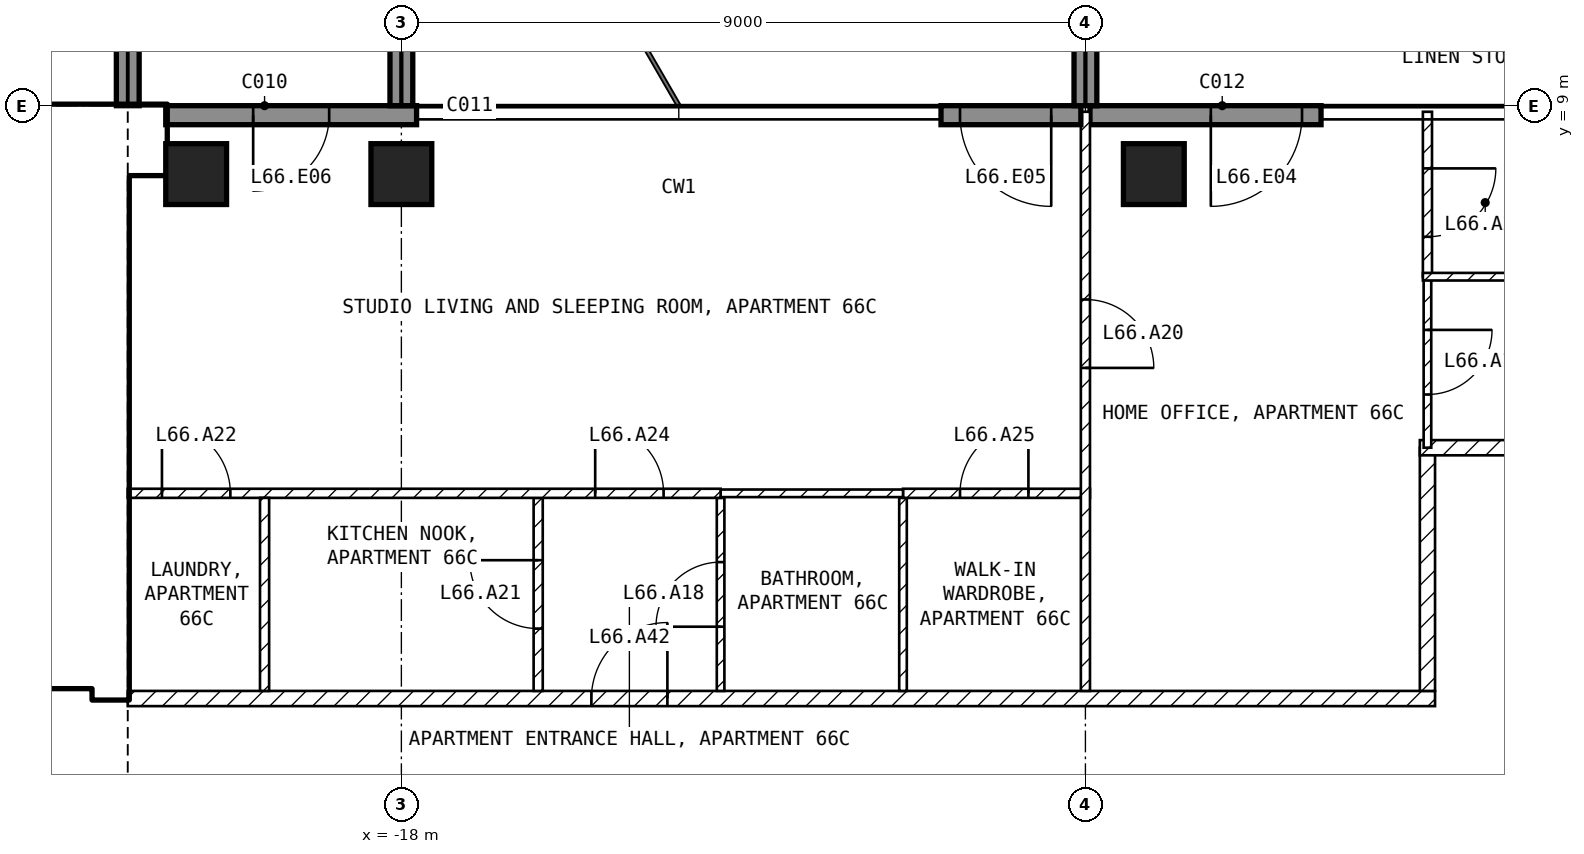
"""IFC4 building model, lengths in metres.
Left out: names, types, materials, properties, quantities, classifications, styles, units other than length and angle.
Written with IfcOpenShell. Run it as: python <this file> out.ifc"""

import sys

from ifc_helpers import new_model, si_unit, direction, frame, frame_2d, origin, origin_2d, place, context, subcontext, project, spatial, rectangle, extrude, element, fill, save


model = new_model("IFC4")
c1 = context("Model", 3, precision=1e-05, world=origin(), true_north=direction((0.0, 1.0)))
c2 = subcontext(c1, "Body", "Model", "MODEL_VIEW")
j1 = project(units=[si_unit("LENGTHUNIT", "METRE"), si_unit("PLANEANGLEUNIT", "RADIAN")], contexts=[c1])
p1 = place(None, origin())
s1 = spatial("IfcSite", under=j1, at=p1, CompositionType="ELEMENT")
p2 = place(p1, origin())
s2 = spatial("IfcBuilding", under=s1, at=p2, CompositionType="ELEMENT")
p3 = place(p2, frame((0.0, 0.0, 260.5)))
s3 = spatial("IfcBuildingStorey", under=s2, at=p3, CompositionType="ELEMENT", Elevation=260.5)
for number, where, z_axis, x_axis in (
    (1, (-20.7, 8.1, -0.25), (0.0, 0.0, 1.0), (1.0, 0.0, 0.0)),
    (2, (-18.0, 8.1, -0.25), (0.0, 0.0, 1.0), (1.0, 0.0, 0.0)),
    (3, (-8.1, 8.1, -0.25), (0.0, 0.0, 1.0), (1.0, 0.0, 0.0)),
):
    element("IfcColumn", number, at=place(p3, frame(where, z_axis=z_axis, x_axis=x_axis)), inside=s3, PredefinedType="COLUMN", context=c2, shape_type="SweptSolid", body=[
        extrude(rectangle(XDim=0.8, YDim=0.8, at=origin_2d()), origin(), (0.0, 0.0, 1.0), 3.5),
    ])
p4 = place(p3, frame((-5.9, 8.875, 0.0), z_axis=(0.0, 0.0, 1.0), x_axis=(-1.0, 0.0, 0.0)))
e4 = element("IfcWall", 4, at=p4, inside=s3, PredefinedType="SOLIDWALL", context=c2, shape_type="SweptSolid", body=[
    extrude(rectangle(XDim=3.04, YDim=0.25, at=frame_2d((1.52, 0.0))), origin(), (0.0, 0.0, 1.0), 3.25),
])
p5 = place(p4, frame((0.25, 0.0, 0.0)))
e5 = element("IfcOpeningElement", 5, at=p5, cuts=e4, PredefinedType="OPENING", context=c2, shape_type="SweptSolid", body=[
    extrude(rectangle(XDim=1.2, YDim=2.4, at=frame_2d((0.6, 1.2))), frame((0.0, 0.135, 0.0), z_axis=(0.0, -1.0, 0.0), x_axis=(1.0, 0.0, 0.0)), (0.0, 0.0, 1.0), 0.27),
])
p6 = place(p3, frame((-9.06, 8.875, 0.0), z_axis=(0.0, 0.0, 1.0), x_axis=(-1.0, 0.0, 0.0)))
e6 = element("IfcWall", 6, at=p6, inside=s3, PredefinedType="SOLIDWALL", context=c2, shape_type="SweptSolid", body=[
    extrude(rectangle(XDim=1.84, YDim=0.25, at=frame_2d((0.92, 0.0))), origin(), (0.0, 0.0, 1.0), 3.25),
])
p7 = place(p6, frame((0.39, 0.0, 0.0)))
e7 = element("IfcOpeningElement", 7, at=p7, cuts=e6, PredefinedType="OPENING", context=c2, shape_type="SweptSolid", body=[
    extrude(rectangle(XDim=1.2, YDim=2.4, at=frame_2d((0.6, 1.2))), frame((0.0, 0.135, 0.0), z_axis=(0.0, -1.0, 0.0), x_axis=(1.0, 0.0, 0.0)), (0.0, 0.0, 1.0), 0.27),
])
p8 = place(p3, frame((-17.8, 8.875, 0.0), z_axis=(0.0, 0.0, 1.0), x_axis=(-1.0, 0.0, 0.0)))
e8 = element("IfcWall", 8, at=p8, inside=s3, PredefinedType="SOLIDWALL", context=c2, shape_type="SweptSolid", body=[
    extrude(rectangle(XDim=3.3, YDim=0.25, at=frame_2d((1.65, 0.0))), origin(), (0.0, 0.0, 1.0), 3.25),
])
p9 = place(p8, frame((1.15, 0.0, 0.0)))
e9 = element("IfcOpeningElement", 9, at=p9, cuts=e8, PredefinedType="OPENING", context=c2, shape_type="SweptSolid", body=[
    extrude(rectangle(XDim=1.0, YDim=2.4, at=frame_2d((0.5, 1.2))), frame((0.0, 0.135, 0.0), z_axis=(0.0, -1.0, 0.0), x_axis=(1.0, 0.0, 0.0)), (0.0, 0.0, 1.0), 0.27),
])
for number, where, z_axis, x_axis in (
    (10, (-21.6, 9.0, 0.0), (0.0, 0.0, 1.0), (0.0, 1.0, 0.0)),
    (11, (-18.0, 9.0, 0.0), (0.0, 0.0, 1.0), (0.0, 1.0, 0.0)),
    (12, (-9.0, 9.0, 0.0), (0.0, 0.0, 1.0), (0.0, 1.0, 0.0)),
):
    element("IfcWall", number, at=place(p3, frame(where, z_axis=z_axis, x_axis=x_axis)), inside=s3, PredefinedType="SOLIDWALL", context=c2, shape_type="SweptSolid", body=[
        extrude(rectangle(XDim=2.7, YDim=0.3, at=frame_2d((1.35, 0.0))), origin(), (0.0, 0.0, 1.0), 3.25),
    ])
p10 = place(p3, frame((-29.75, 8.55, 0.0), z_axis=(0.0, 0.0, 1.0), x_axis=(1.0, 0.0, 0.0)))
e13 = element("IfcWall", 13, at=p10, inside=s3, PredefinedType="SHEAR", context=c2, shape_type="SweptSolid", body=[
    extrude(rectangle(XDim=8.65, YDim=0.9, at=frame_2d((4.325, 0.0))), origin(), (0.0, 0.0, 1.0), 3.25),
])
p11 = place(p3, frame((-21.825, 1.2, 0.0), z_axis=(0.0, 0.0, 1.0), x_axis=(0.0, 1.0, 0.0)))
e14 = element("IfcWall", 14, at=p11, inside=s3, PredefinedType="SHEAR", context=c2, shape_type="SweptSolid", body=[
    extrude(rectangle(XDim=6.9, YDim=0.45, at=frame_2d((3.45, 0.0))), origin(), (0.0, 0.0, 1.0), 3.25),
])
p12 = place(p3, frame((-33.35, 1.45, 0.0), z_axis=(0.0, 0.0, 1.0), x_axis=(1.0, 0.0, 0.0)))
e15 = element("IfcWall", 15, at=p12, inside=s3, PredefinedType="SOLIDWALL", context=c2, shape_type="SweptSolid", body=[
    extrude(rectangle(XDim=11.3, YDim=0.2, at=frame_2d((5.65, 0.0))), origin(), (0.0, 0.0, 1.0), 3.25),
])
p13 = place(p12, frame((9.55, 0.0, 0.0)))
e16 = element("IfcOpeningElement", 16, at=p13, cuts=e15, PredefinedType="OPENING", context=c2, shape_type="SweptSolid", body=[
    extrude(rectangle(XDim=1.0, YDim=2.1, at=frame_2d((0.5, 1.05))), frame((0.0, 0.11, 0.0), z_axis=(0.0, -1.0, 0.0), x_axis=(1.0, 0.0, 0.0)), (0.0, 0.0, 1.0), 0.22),
])
p14 = place(p12, frame((7.05, 0.0, 0.0)))
e17 = element("IfcOpeningElement", 17, at=p14, cuts=e15, PredefinedType="OPENING", context=c2, shape_type="SweptSolid", body=[
    extrude(rectangle(XDim=1.0, YDim=2.1, at=frame_2d((0.5, 1.05))), frame((0.0, 0.11, 0.0), z_axis=(0.0, -1.0, 0.0), x_axis=(1.0, 0.0, 0.0)), (0.0, 0.0, 1.0), 0.22),
])
p15 = place(p12, frame((1.175, 0.0, 0.0)))
e18 = element("IfcOpeningElement", 18, at=p15, cuts=e15, PredefinedType="OPENING", context=c2, shape_type="SweptSolid", body=[
    extrude(rectangle(XDim=0.9, YDim=2.1, at=frame_2d((0.45, 1.05))), frame((0.0, 0.11, 0.0), z_axis=(0.0, -1.0, 0.0), x_axis=(1.0, 0.0, 0.0)), (0.0, 0.0, 1.0), 0.22),
])
p16 = place(p3, frame((-28.35, 5.15, 0.0), z_axis=(0.0, 0.0, 1.0), x_axis=(1.0, 0.0, 0.0)))
e19 = element("IfcWall", 19, at=p16, inside=s3, PredefinedType="SOLIDWALL", context=c2, shape_type="SweptSolid", body=[
    extrude(rectangle(XDim=6.3, YDim=0.2, at=frame_2d((3.15, 0.0))), origin(), (0.0, 0.0, 1.0), 3.25),
])
p17 = place(p16, frame((5.1, 0.0, 0.0)))
e20 = element("IfcOpeningElement", 20, at=p17, cuts=e19, PredefinedType="OPENING", context=c2, shape_type="SweptSolid", body=[
    extrude(rectangle(XDim=1.0, YDim=2.1, at=frame_2d((0.5, 1.05))), frame((0.0, 0.11, 0.0), z_axis=(0.0, -1.0, 0.0), x_axis=(1.0, 0.0, 0.0)), (0.0, 0.0, 1.0), 0.22),
])
p18 = place(p3, frame((-21.6, 1.2, 0.0), z_axis=(0.0, 0.0, 1.0), x_axis=(1.0, 0.0, 0.0)))
e21 = element("IfcWall", 21, at=p18, inside=s3, PredefinedType="PARTITIONING", context=c2, shape_type="SweptSolid", body=[
    extrude(rectangle(XDim=17.2, YDim=0.2, at=frame_2d((8.6, 0.0))), origin(), (0.0, 0.0, 1.0), 3.25),
])
p19 = place(p18, frame((6.1, 0.0, 0.0)))
e22 = element("IfcOpeningElement", 22, at=p19, cuts=e21, PredefinedType="OPENING", context=c2, shape_type="SweptSolid", body=[
    extrude(rectangle(XDim=1.0, YDim=2.1, at=frame_2d((0.5, 1.05))), frame((0.0, 0.11, 0.0), z_axis=(0.0, -1.0, 0.0), x_axis=(1.0, 0.0, 0.0)), (0.0, 0.0, 1.0), 0.22),
])
p20 = place(p3, frame((-4.5, 1.3, 0.0), z_axis=(0.0, 0.0, 1.0), x_axis=(0.0, 1.0, 0.0)))
e23 = element("IfcWall", 23, at=p20, inside=s3, PredefinedType="PARTITIONING", context=c2, shape_type="SweptSolid", body=[
    extrude(rectangle(XDim=3.2, YDim=0.2, at=frame_2d((1.6, 0.0))), origin(), (0.0, 0.0, 1.0), 3.25),
])
p21 = place(p3, frame((-4.6, 4.5, 0.0), z_axis=(0.0, 0.0, 1.0), x_axis=(1.0, 0.0, 0.0)))
e24 = element("IfcWall", 24, at=p21, inside=s3, PredefinedType="PARTITIONING", context=c2, shape_type="SweptSolid", body=[
    extrude(rectangle(XDim=3.5, YDim=0.2, at=frame_2d((1.75, 0.0))), origin(), (0.0, 0.0, 1.0), 3.25),
])
p22 = place(p3, frame((-11.4, 1.3, 0.0), z_axis=(0.0, 0.0, 1.0), x_axis=(0.0, 1.0, 0.0)))
e25 = element("IfcWall", 25, at=p22, inside=s3, PredefinedType="PARTITIONING", context=c2, shape_type="SweptSolid", body=[
    extrude(rectangle(XDim=2.54, YDim=0.1, at=frame_2d((1.27, 0.0))), origin(), (0.0, 0.0, 1.0), 3.25),
])
p23 = place(p3, frame((-11.4, 3.9, 0.0), z_axis=(0.0, 0.0, 1.0), x_axis=(1.0, 0.0, 0.0)))
e26 = element("IfcWall", 26, at=p23, inside=s3, PredefinedType="PARTITIONING", context=c2, shape_type="SweptSolid", body=[
    extrude(rectangle(XDim=2.46, YDim=0.12, at=frame_2d((1.23, 0.0))), origin(), (0.0, 0.0, 1.0), 3.25),
])
p24 = place(p23, frame((0.75, 0.0, 0.0)))
e27 = element("IfcOpeningElement", 27, at=p24, cuts=e26, PredefinedType="OPENING", context=c2, shape_type="SweptSolid", body=[
    extrude(rectangle(XDim=0.9, YDim=2.1, at=frame_2d((0.45, 1.05))), frame((0.0, 0.07, 0.0), z_axis=(0.0, -1.0, 0.0), x_axis=(1.0, 0.0, 0.0)), (0.0, 0.0, 1.0), 0.14),
])
p25 = place(p3, frame((-9.0, 8.92, 0.0), z_axis=(0.0, 0.0, 1.0), x_axis=(0.0, -1.0, 0.0)))
e28 = element("IfcWall", 28, at=p25, inside=s3, PredefinedType="PARTITIONING", context=c2, shape_type="SweptSolid", body=[
    extrude(rectangle(XDim=7.62, YDim=0.12, at=frame_2d((3.81, 0.0))), origin(), (0.0, 0.0, 1.0), 3.25),
])
p26 = place(p25, frame((2.47, 0.0, 0.0)))
e29 = element("IfcOpeningElement", 29, at=p26, cuts=e28, PredefinedType="OPENING", context=c2, shape_type="SweptSolid", body=[
    extrude(rectangle(XDim=0.9, YDim=2.1, at=frame_2d((0.45, 1.05))), frame((0.0, 0.07, 0.0), z_axis=(0.0, -1.0, 0.0), x_axis=(1.0, 0.0, 0.0)), (0.0, 0.0, 1.0), 0.14),
])
p27 = place(p3, frame((-13.8, 1.3, 0.0), z_axis=(0.0, 0.0, 1.0), x_axis=(0.0, 1.0, 0.0)))
e30 = element("IfcWall", 30, at=p27, inside=s3, PredefinedType="PARTITIONING", context=c2, shape_type="SweptSolid", body=[
    extrude(rectangle(XDim=2.54, YDim=0.1, at=frame_2d((1.27, 0.0))), origin(), (0.0, 0.0, 1.0), 3.25),
])
p28 = place(p27, frame((0.845, 0.0, 0.0)))
e31 = element("IfcOpeningElement", 31, at=p28, cuts=e30, PredefinedType="OPENING", context=c2, shape_type="SweptSolid", body=[
    extrude(rectangle(XDim=0.85, YDim=2.1, at=frame_2d((0.425, 1.05))), frame((0.0, 0.06, 0.0), z_axis=(0.0, -1.0, 0.0), x_axis=(1.0, 0.0, 0.0)), (0.0, 0.0, 1.0), 0.12),
])
p29 = place(p3, frame((-13.8, 3.9, 0.0), z_axis=(0.0, 0.0, 1.0), x_axis=(1.0, 0.0, 0.0)))
e32 = element("IfcWall", 32, at=p29, inside=s3, PredefinedType="PARTITIONING", context=c2, shape_type="SweptSolid", body=[
    extrude(rectangle(XDim=2.4, YDim=0.1, at=frame_2d((1.2, 0.0))), origin(), (0.0, 0.0, 1.0), 3.25),
])
p30 = place(p3, frame((-16.2, 1.3, 0.0), z_axis=(0.0, 0.0, 1.0), x_axis=(0.0, 1.0, 0.0)))
e33 = element("IfcWall", 33, at=p30, inside=s3, PredefinedType="PARTITIONING", context=c2, shape_type="SweptSolid", body=[
    extrude(rectangle(XDim=2.54, YDim=0.12, at=frame_2d((1.27, 0.0))), origin(), (0.0, 0.0, 1.0), 3.25),
])
p31 = place(p30, frame((0.82, 0.0, 0.0)))
e34 = element("IfcOpeningElement", 34, at=p31, cuts=e33, PredefinedType="OPENING", context=c2, shape_type="SweptSolid", body=[
    extrude(rectangle(XDim=0.9, YDim=2.1, at=frame_2d((0.45, 1.05))), frame((0.0, 0.07, 0.0), z_axis=(0.0, -1.0, 0.0), x_axis=(1.0, 0.0, 0.0)), (0.0, 0.0, 1.0), 0.14),
])
p32 = place(p3, frame((-21.6, 3.9, 0.0), z_axis=(0.0, 0.0, 1.0), x_axis=(1.0, 0.0, 0.0)))
e35 = element("IfcWall", 35, at=p32, inside=s3, PredefinedType="PARTITIONING", context=c2, shape_type="SweptSolid", body=[
    extrude(rectangle(XDim=7.8, YDim=0.12, at=frame_2d((3.9, 0.0))), origin(), (0.0, 0.0, 1.0), 3.25),
])
p33 = place(p32, frame((0.45, 0.0, 0.0)))
e36 = element("IfcOpeningElement", 36, at=p33, cuts=e35, PredefinedType="OPENING", context=c2, shape_type="SweptSolid", body=[
    extrude(rectangle(XDim=0.9, YDim=2.1, at=frame_2d((0.45, 1.05))), frame((0.0, 0.07, 0.0), z_axis=(0.0, -1.0, 0.0), x_axis=(1.0, 0.0, 0.0)), (0.0, 0.0, 1.0), 0.14),
])
p34 = place(p32, frame((6.15, 0.0, 0.0)))
e37 = element("IfcOpeningElement", 37, at=p34, cuts=e35, PredefinedType="OPENING", context=c2, shape_type="SweptSolid", body=[
    extrude(rectangle(XDim=0.9, YDim=2.1, at=frame_2d((0.45, 1.05))), frame((0.0, 0.07, 0.0), z_axis=(0.0, -1.0, 0.0), x_axis=(1.0, 0.0, 0.0)), (0.0, 0.0, 1.0), 0.14),
])
p35 = place(p3, frame((-19.8, 1.3, 0.0), z_axis=(0.0, 0.0, 1.0), x_axis=(0.0, 1.0, 0.0)))
e38 = element("IfcWall", 38, at=p35, inside=s3, PredefinedType="PARTITIONING", context=c2, shape_type="SweptSolid", body=[
    extrude(rectangle(XDim=2.54, YDim=0.12, at=frame_2d((1.27, 0.0))), origin(), (0.0, 0.0, 1.0), 3.25),
])
p36 = place(p3, frame((-4.5, 6.75, 0.0), z_axis=(0.0, 0.0, 1.0), x_axis=(0.0, -1.0, 0.0)))
e39 = element("IfcWall", 39, at=p36, inside=s3, PredefinedType="PARTITIONING", context=c2, shape_type="SweptSolid", body=[
    extrude(rectangle(XDim=2.25, YDim=0.1, at=frame_2d((1.125, 0.0))), origin(), (0.0, 0.0, 1.0), 3.25),
])
p37 = place(p36, frame((0.7, 0.0, 0.0)))
e40 = element("IfcOpeningElement", 40, at=p37, cuts=e39, PredefinedType="OPENING", context=c2, shape_type="SweptSolid", body=[
    extrude(rectangle(XDim=0.85, YDim=2.1, at=frame_2d((0.425, 1.05))), frame((0.0, 0.06, 0.0), z_axis=(0.0, -1.0, 0.0), x_axis=(1.0, 0.0, 0.0)), (0.0, 0.0, 1.0), 0.12),
])
p38 = place(p3, frame((-4.5, 8.92, 0.0), z_axis=(0.0, 0.0, 1.0), x_axis=(0.0, -1.0, 0.0)))
e41 = element("IfcWall", 41, at=p38, inside=s3, PredefinedType="PARTITIONING", context=c2, shape_type="SweptSolid", body=[
    extrude(rectangle(XDim=2.17, YDim=0.12, at=frame_2d((1.085, 0.0))), origin(), (0.0, 0.0, 1.0), 3.25),
])
p39 = place(p38, frame((0.745, 0.0, 0.0)))
e42 = element("IfcOpeningElement", 42, at=p39, cuts=e41, PredefinedType="OPENING", context=c2, shape_type="SweptSolid", body=[
    extrude(rectangle(XDim=0.9, YDim=2.1, at=frame_2d((0.45, 1.05))), frame((0.0, 0.07, 0.0), z_axis=(0.0, -1.0, 0.0), x_axis=(1.0, 0.0, 0.0)), (0.0, 0.0, 1.0), 0.14),
])
p40 = place(p3, frame((-4.56, 6.75, 0.0), z_axis=(0.0, 0.0, 1.0), x_axis=(1.0, 0.0, 0.0)))
e43 = element("IfcWall", 43, at=p40, inside=s3, PredefinedType="PARTITIONING", context=c2, shape_type="SweptSolid", body=[
    extrude(rectangle(XDim=3.46, YDim=0.1, at=frame_2d((1.73, 0.0))), origin(), (0.0, 0.0, 1.0), 3.25),
])
p41 = place(p5, origin())
e44 = element("IfcDoor", 44, at=p41, inside=s3, OperationType="SINGLE_SWING_RIGHT", PredefinedType="DOOR", context=c2, shape_type="SweptSolid", body=[
    extrude(rectangle(XDim=1.2, YDim=2.4, at=frame_2d((0.6, 1.2))), frame((0.0, 0.025, 0.0), z_axis=(0.0, -1.0, 0.0), x_axis=(1.0, 0.0, 0.0)), (0.0, 0.0, 1.0), 0.05),
])
fill(e5, e44)
p42 = place(p7, origin())
e45 = element("IfcDoor", 45, at=p42, inside=s3, OperationType="SINGLE_SWING_LEFT", PredefinedType="DOOR", context=c2, shape_type="SweptSolid", body=[
    extrude(rectangle(XDim=1.2, YDim=2.4, at=frame_2d((0.6, 1.2))), frame((0.0, 0.025, 0.0), z_axis=(0.0, -1.0, 0.0), x_axis=(1.0, 0.0, 0.0)), (0.0, 0.0, 1.0), 0.05),
])
fill(e7, e45)
p43 = place(p9, origin())
e46 = element("IfcDoor", 46, at=p43, inside=s3, OperationType="SINGLE_SWING_RIGHT", PredefinedType="DOOR", context=c2, shape_type="SweptSolid", body=[
    extrude(rectangle(XDim=1.0, YDim=2.4, at=frame_2d((0.5, 1.2))), frame((0.0, 0.025, 0.0), z_axis=(0.0, -1.0, 0.0), x_axis=(1.0, 0.0, 0.0)), (0.0, 0.0, 1.0), 0.05),
])
fill(e9, e46)
p44 = place(p17, origin())
e47 = element("IfcDoor", 47, at=p44, inside=s3, OperationType="SINGLE_SWING_LEFT", PredefinedType="DOOR", context=c2, shape_type="SweptSolid", body=[
    extrude(rectangle(XDim=1.0, YDim=2.1, at=frame_2d((0.5, 1.05))), frame((0.0, 0.025, 0.0), z_axis=(0.0, -1.0, 0.0), x_axis=(1.0, 0.0, 0.0)), (0.0, 0.0, 1.0), 0.05),
])
fill(e20, e47)
p45 = place(p28, origin())
e48 = element("IfcDoor", 48, at=p45, inside=s3, OperationType="SINGLE_SWING_LEFT", PredefinedType="DOOR", context=c2, shape_type="SweptSolid", body=[
    extrude(rectangle(XDim=0.85, YDim=2.1, at=frame_2d((0.425, 1.05))), frame((0.0, 0.025, 0.0), z_axis=(0.0, -1.0, 0.0), x_axis=(1.0, 0.0, 0.0)), (0.0, 0.0, 1.0), 0.05),
])
fill(e31, e48)
p46 = place(p37, origin())
e49 = element("IfcDoor", 49, at=p46, inside=s3, OperationType="SINGLE_SWING_LEFT", PredefinedType="DOOR", context=c2, shape_type="SweptSolid", body=[
    extrude(rectangle(XDim=0.85, YDim=2.1, at=frame_2d((0.425, 1.05))), frame((0.0, 0.025, 0.0), z_axis=(0.0, -1.0, 0.0), x_axis=(1.0, 0.0, 0.0)), (0.0, 0.0, 1.0), 0.05),
])
fill(e40, e49)
p47 = place(p26, origin())
e50 = element("IfcDoor", 50, at=p47, inside=s3, OperationType="SINGLE_SWING_RIGHT", PredefinedType="DOOR", context=c2, shape_type="SweptSolid", body=[
    extrude(rectangle(XDim=0.9, YDim=2.1, at=frame_2d((0.45, 1.05))), frame((0.0, 0.025, 0.0), z_axis=(0.0, -1.0, 0.0), x_axis=(1.0, 0.0, 0.0)), (0.0, 0.0, 1.0), 0.05),
])
fill(e29, e50)
p48 = place(p31, origin())
e51 = element("IfcDoor", 51, at=p48, inside=s3, OperationType="SINGLE_SWING_RIGHT", PredefinedType="DOOR", context=c2, shape_type="SweptSolid", body=[
    extrude(rectangle(XDim=0.9, YDim=2.1, at=frame_2d((0.45, 1.05))), frame((0.0, 0.025, 0.0), z_axis=(0.0, -1.0, 0.0), x_axis=(1.0, 0.0, 0.0)), (0.0, 0.0, 1.0), 0.05),
])
fill(e34, e51)
p49 = place(p33, origin())
e52 = element("IfcDoor", 52, at=p49, inside=s3, OperationType="SINGLE_SWING_LEFT", PredefinedType="DOOR", context=c2, shape_type="SweptSolid", body=[
    extrude(rectangle(XDim=0.9, YDim=2.1, at=frame_2d((0.45, 1.05))), frame((0.0, 0.025, 0.0), z_axis=(0.0, -1.0, 0.0), x_axis=(1.0, 0.0, 0.0)), (0.0, 0.0, 1.0), 0.05),
])
fill(e36, e52)
p50 = place(p39, origin())
e53 = element("IfcDoor", 53, at=p50, inside=s3, OperationType="SINGLE_SWING_LEFT", PredefinedType="DOOR", context=c2, shape_type="SweptSolid", body=[
    extrude(rectangle(XDim=0.9, YDim=2.1, at=frame_2d((0.45, 1.05))), frame((0.0, 0.025, 0.0), z_axis=(0.0, -1.0, 0.0), x_axis=(1.0, 0.0, 0.0)), (0.0, 0.0, 1.0), 0.05),
])
fill(e42, e53)
p51 = place(p34, origin())
e54 = element("IfcDoor", 54, at=p51, inside=s3, OperationType="SINGLE_SWING_LEFT", PredefinedType="DOOR", context=c2, shape_type="SweptSolid", body=[
    extrude(rectangle(XDim=0.9, YDim=2.1, at=frame_2d((0.45, 1.05))), frame((0.0, 0.025, 0.0), z_axis=(0.0, -1.0, 0.0), x_axis=(1.0, 0.0, 0.0)), (0.0, 0.0, 1.0), 0.05),
])
fill(e37, e54)
p52 = place(p24, origin())
e55 = element("IfcDoor", 55, at=p52, inside=s3, OperationType="SINGLE_SWING_RIGHT", PredefinedType="DOOR", context=c2, shape_type="SweptSolid", body=[
    extrude(rectangle(XDim=0.9, YDim=2.1, at=frame_2d((0.45, 1.05))), frame((0.0, 0.025, 0.0), z_axis=(0.0, -1.0, 0.0), x_axis=(1.0, 0.0, 0.0)), (0.0, 0.0, 1.0), 0.05),
])
fill(e27, e55)
p53 = place(p19, origin())
e56 = element("IfcDoor", 56, at=p53, inside=s3, OperationType="SINGLE_SWING_RIGHT", PredefinedType="DOOR", context=c2, shape_type="SweptSolid", body=[
    extrude(rectangle(XDim=1.0, YDim=2.1, at=frame_2d((0.5, 1.05))), frame((0.0, 0.025, 0.0), z_axis=(0.0, -1.0, 0.0), x_axis=(1.0, 0.0, 0.0)), (0.0, 0.0, 1.0), 0.05),
])
fill(e22, e56)
save(model, sys.argv[1])
